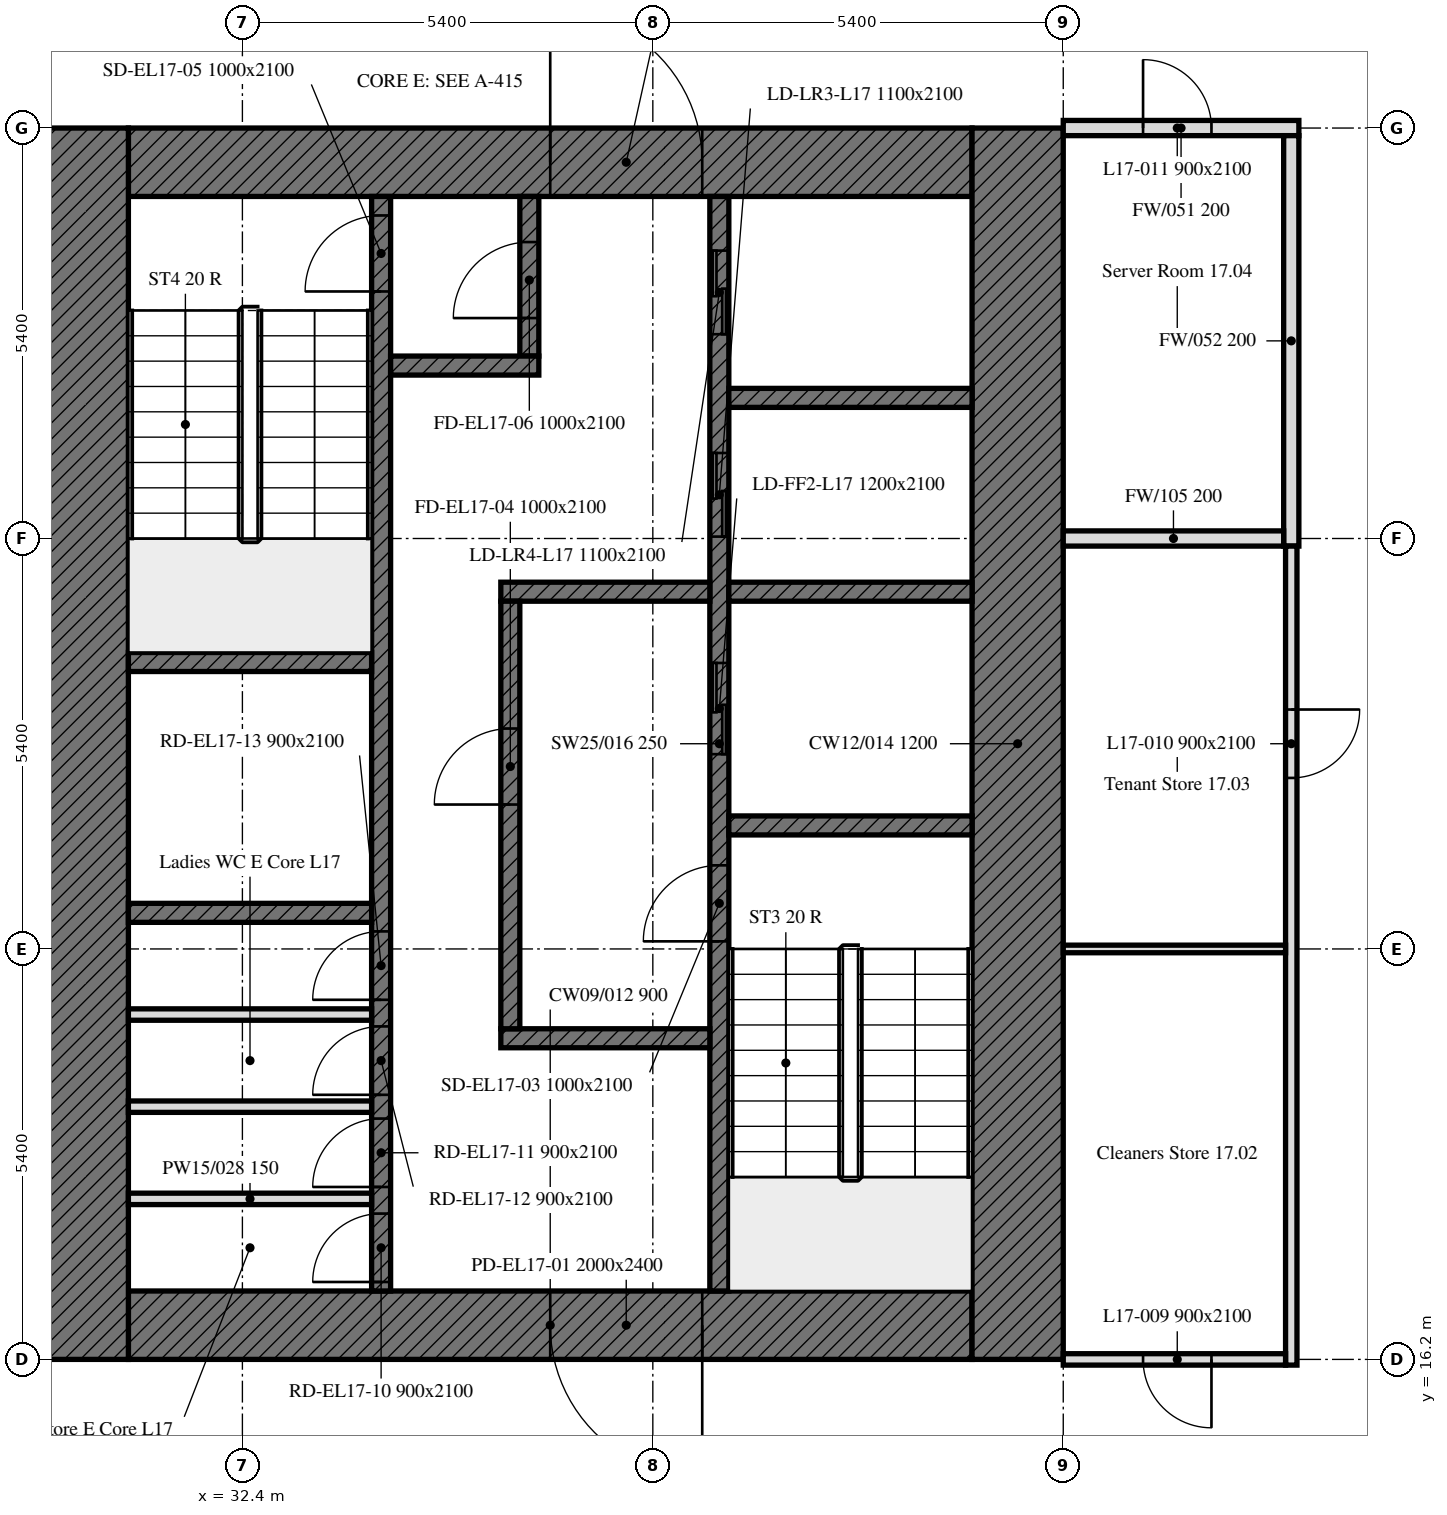
"""IFC4 building model, lengths in metres.
Left out: names, types, materials, properties, quantities, classifications, styles, units other than length and angle.
Written with IfcOpenShell. Run it as: python <this file> out.ifc"""

import sys

from ifc_helpers import new_model, si_unit, direction, frame, frame_2d, origin, place, context, subcontext, project, spatial, rectangle, extrude, element, fill, save


model = new_model("IFC4")
c1 = context("Model", 3, precision=1e-05, world=origin(), true_north=direction((0.0, 1.0)))
c2 = subcontext(c1, "Body", "Model", "MODEL_VIEW")
j1 = project(units=[si_unit("LENGTHUNIT", "METRE"), si_unit("PLANEANGLEUNIT", "RADIAN")], contexts=[c1])
p1 = place(None, origin())
s1 = spatial("IfcSite", under=j1, at=p1, CompositionType="ELEMENT")
p2 = place(p1, origin())
s2 = spatial("IfcBuilding", under=s1, at=p2, CompositionType="ELEMENT")
p3 = place(p2, frame((0.0, 0.0, 76.4)))
s3 = spatial("IfcBuildingStorey", under=s2, at=p3, CompositionType="ELEMENT", Elevation=76.4)
p4 = place(p3, frame((42.0, 16.65, 0.0), z_axis=(0.0, 0.0, 1.0), x_axis=(-1.0, 0.0, 0.0)))
e1 = element("IfcWall", 1, at=p4, inside=s3, PredefinedType="SOLIDWALL", context=c2, shape_type="SweptSolid", body=[
    extrude(rectangle(XDim=11.1, YDim=0.9, at=frame_2d((5.55, 0.0))), origin(), (0.0, 0.0, 1.0), 3.5),
])
p5 = place(p4, frame((3.55, 0.0, 0.0)))
e2 = element("IfcOpeningElement", 2, at=p5, cuts=e1, PredefinedType="OPENING", context=c2, shape_type="SweptSolid", body=[
    extrude(rectangle(XDim=2.0, YDim=2.4, at=frame_2d((1.0, 1.2))), frame((0.0, 0.45, 0.0), z_axis=(0.0, -1.0, 0.0), x_axis=(1.0, 0.0, 0.0)), (0.0, 0.0, 1.0), 0.9),
])
p6 = place(p3, frame((30.9, 31.95, 0.0), z_axis=(0.0, 0.0, 1.0), x_axis=(1.0, 0.0, 0.0)))
e3 = element("IfcWall", 3, at=p6, inside=s3, PredefinedType="SOLIDWALL", context=c2, shape_type="SweptSolid", body=[
    extrude(rectangle(XDim=11.1, YDim=0.9, at=frame_2d((5.55, 0.0))), origin(), (0.0, 0.0, 1.0), 3.5),
])
p7 = place(p6, frame((5.55, 0.0, 0.0)))
e4 = element("IfcOpeningElement", 4, at=p7, cuts=e3, PredefinedType="OPENING", context=c2, shape_type="SweptSolid", body=[
    extrude(rectangle(XDim=2.0, YDim=2.4, at=frame_2d((1.0, 1.2))), frame((0.0, 0.45, 0.0), z_axis=(0.0, -1.0, 0.0), x_axis=(1.0, 0.0, 0.0)), (0.0, 0.0, 1.0), 0.9),
])
for number, where, z_axis, x_axis in (
    (5, (42.6, 32.4, 0.0), (0.0, 0.0, 1.0), (0.0, -1.0, 0.0)),
    (6, (30.3, 16.2, 0.0), (0.0, 0.0, 1.0), (0.0, 1.0, 0.0)),
):
    element("IfcWall", number, at=place(p3, frame(where, z_axis=z_axis, x_axis=x_axis)), inside=s3, PredefinedType="SOLIDWALL", context=c2, shape_type="SweptSolid", body=[
        extrude(rectangle(XDim=16.2, YDim=1.2, at=frame_2d((8.1, 0.0))), origin(), (0.0, 0.0, 1.0), 3.5),
    ])
p8 = place(p3, frame((38.675, 17.1, 0.0), z_axis=(0.0, 0.0, 1.0), x_axis=(0.0, 1.0, 0.0)))
e7 = element("IfcWall", 7, at=p8, inside=s3, PredefinedType="SOLIDWALL", context=c2, shape_type="SweptSolid", body=[
    extrude(rectangle(XDim=14.4, YDim=0.25, at=frame_2d((7.2, 0.0))), origin(), (0.0, 0.0, 1.0), 3.5),
])
p9 = place(p8, frame((4.6, 0.0, 0.0)))
e8 = element("IfcOpeningElement", 8, at=p9, cuts=e7, PredefinedType="OPENING", context=c2, shape_type="SweptSolid", body=[
    extrude(rectangle(XDim=1.0, YDim=2.1, at=frame_2d((0.5, 1.05))), frame((0.0, 0.125, 0.0), z_axis=(0.0, -1.0, 0.0), x_axis=(1.0, 0.0, 0.0)), (0.0, 0.0, 1.0), 0.25),
])
p10 = place(p8, frame((7.062, 0.0, 0.0)))
e9 = element("IfcOpeningElement", 9, at=p10, cuts=e7, PredefinedType="OPENING", context=c2, shape_type="SweptSolid", body=[
    extrude(rectangle(XDim=1.2, YDim=2.1, at=frame_2d((0.6, 1.05))), frame((0.0, 0.125, 0.0), z_axis=(0.0, -1.0, 0.0), x_axis=(1.0, 0.0, 0.0)), (0.0, 0.0, 1.0), 0.25),
])
p11 = place(p8, frame((9.925, 0.0, 0.0)))
e10 = element("IfcOpeningElement", 10, at=p11, cuts=e7, PredefinedType="OPENING", context=c2, shape_type="SweptSolid", body=[
    extrude(rectangle(XDim=1.1, YDim=2.1, at=frame_2d((0.55, 1.05))), frame((0.0, 0.125, 0.0), z_axis=(0.0, -1.0, 0.0), x_axis=(1.0, 0.0, 0.0)), (0.0, 0.0, 1.0), 0.25),
])
p12 = place(p8, frame((12.587, 0.0, 0.0)))
e11 = element("IfcOpeningElement", 11, at=p12, cuts=e7, PredefinedType="OPENING", context=c2, shape_type="SweptSolid", body=[
    extrude(rectangle(XDim=1.1, YDim=2.1, at=frame_2d((0.55, 1.05))), frame((0.0, 0.125, 0.0), z_axis=(0.0, -1.0, 0.0), x_axis=(1.0, 0.0, 0.0)), (0.0, 0.0, 1.0), 0.25),
])
p13 = place(p3, frame((34.225, 17.1, 0.0), z_axis=(0.0, 0.0, 1.0), x_axis=(0.0, 1.0, 0.0)))
e12 = element("IfcWall", 12, at=p13, inside=s3, PredefinedType="SOLIDWALL", context=c2, shape_type="SweptSolid", body=[
    extrude(rectangle(XDim=14.4, YDim=0.25, at=frame_2d((7.2, 0.0))), origin(), (0.0, 0.0, 1.0), 3.5),
])
p14 = place(p13, frame((13.15, 0.0, 0.0)))
e13 = element("IfcOpeningElement", 13, at=p14, cuts=e12, PredefinedType="OPENING", context=c2, shape_type="SweptSolid", body=[
    extrude(rectangle(XDim=1.0, YDim=2.1, at=frame_2d((0.5, 1.05))), frame((0.0, 0.125, 0.0), z_axis=(0.0, -1.0, 0.0), x_axis=(1.0, 0.0, 0.0)), (0.0, 0.0, 1.0), 0.25),
])
p15 = place(p13, frame((0.118, 0.0, 0.0)))
e14 = element("IfcOpeningElement", 14, at=p15, cuts=e12, PredefinedType="OPENING", context=c2, shape_type="SweptSolid", body=[
    extrude(rectangle(XDim=0.9, YDim=2.1, at=frame_2d((0.45, 1.05))), frame((0.0, 0.125, 0.0), z_axis=(0.0, -1.0, 0.0), x_axis=(1.0, 0.0, 0.0)), (0.0, 0.0, 1.0), 0.25),
])
p16 = place(p13, frame((1.368, 0.0, 0.0)))
e15 = element("IfcOpeningElement", 15, at=p16, cuts=e12, PredefinedType="OPENING", context=c2, shape_type="SweptSolid", body=[
    extrude(rectangle(XDim=0.9, YDim=2.1, at=frame_2d((0.45, 1.05))), frame((0.0, 0.125, 0.0), z_axis=(0.0, -1.0, 0.0), x_axis=(1.0, 0.0, 0.0)), (0.0, 0.0, 1.0), 0.25),
])
p17 = place(p13, frame((2.581, 0.0, 0.0)))
e16 = element("IfcOpeningElement", 16, at=p17, cuts=e12, PredefinedType="OPENING", context=c2, shape_type="SweptSolid", body=[
    extrude(rectangle(XDim=0.9, YDim=2.1, at=frame_2d((0.45, 1.05))), frame((0.0, 0.125, 0.0), z_axis=(0.0, -1.0, 0.0), x_axis=(1.0, 0.0, 0.0)), (0.0, 0.0, 1.0), 0.25),
])
p18 = place(p13, frame((3.831, 0.0, 0.0)))
e17 = element("IfcOpeningElement", 17, at=p18, cuts=e12, PredefinedType="OPENING", context=c2, shape_type="SweptSolid", body=[
    extrude(rectangle(XDim=0.9, YDim=2.1, at=frame_2d((0.45, 1.05))), frame((0.0, 0.125, 0.0), z_axis=(0.0, -1.0, 0.0), x_axis=(1.0, 0.0, 0.0)), (0.0, 0.0, 1.0), 0.25),
])
p19 = place(p3, frame((38.8, 23.225, 0.0), z_axis=(0.0, 0.0, 1.0), x_axis=(1.0, 0.0, 0.0)))
e18 = element("IfcWall", 18, at=p19, inside=s3, PredefinedType="SOLIDWALL", context=c2, shape_type="SweptSolid", body=[
    extrude(rectangle(XDim=3.2, YDim=0.25, at=frame_2d((1.6, 0.0))), origin(), (0.0, 0.0, 1.0), 3.5),
])
for number, where, z_axis, x_axis in (
    (19, (30.9, 25.375, 0.0), (0.0, 0.0, 1.0), (1.0, 0.0, 0.0)),
    (20, (30.9, 22.075, 0.0), (0.0, 0.0, 1.0), (1.0, 0.0, 0.0)),
):
    element("IfcWall", number, at=place(p3, frame(where, z_axis=z_axis, x_axis=x_axis)), inside=s3, PredefinedType="SOLIDWALL", context=c2, shape_type="SweptSolid", body=[
        extrude(rectangle(XDim=3.2, YDim=0.25, at=frame_2d((1.6, 0.0))), origin(), (0.0, 0.0, 1.0), 3.5),
    ])
p20 = place(p3, frame((38.8, 26.3, 0.0), z_axis=(0.0, 0.0, 1.0), x_axis=(1.0, 0.0, 0.0)))
e21 = element("IfcWall", 21, at=p20, inside=s3, PredefinedType="SOLIDWALL", context=c2, shape_type="SweptSolid", body=[
    extrude(rectangle(XDim=3.2, YDim=0.25, at=frame_2d((1.6, 0.0))), origin(), (0.0, 0.0, 1.0), 3.5),
])
for number, where, z_axis, x_axis in (
    (22, (35.8, 26.3, 0.0), (0.0, 0.0, 1.0), (1.0, 0.0, 0.0)),
    (23, (35.8, 20.425, 0.0), (0.0, 0.0, 1.0), (1.0, 0.0, 0.0)),
):
    element("IfcWall", number, at=place(p3, frame(where, z_axis=z_axis, x_axis=x_axis)), inside=s3, PredefinedType="SOLIDWALL", context=c2, shape_type="SweptSolid", body=[
        extrude(rectangle(XDim=2.75, YDim=0.25, at=frame_2d((1.375, 0.0))), origin(), (0.0, 0.0, 1.0), 3.5),
    ])
p21 = place(p3, frame((36.175, 29.4, 0.0), z_axis=(0.0, 0.0, 1.0), x_axis=(0.0, 1.0, 0.0)))
e24 = element("IfcWall", 24, at=p21, inside=s3, PredefinedType="SOLIDWALL", context=c2, shape_type="SweptSolid", body=[
    extrude(rectangle(XDim=2.1, YDim=0.25, at=frame_2d((1.05, 0.0))), origin(), (0.0, 0.0, 1.0), 3.5),
])
p22 = place(p21, frame((0.5, 0.0, 0.0)))
e25 = element("IfcOpeningElement", 25, at=p22, cuts=e24, PredefinedType="OPENING", context=c2, shape_type="SweptSolid", body=[
    extrude(rectangle(XDim=1.0, YDim=2.1, at=frame_2d((0.5, 1.05))), frame((0.0, 0.125, 0.0), z_axis=(0.0, -1.0, 0.0), x_axis=(1.0, 0.0, 0.0)), (0.0, 0.0, 1.0), 0.25),
])
p23 = place(p3, frame((34.35, 29.275, 0.0), z_axis=(0.0, 0.0, 1.0), x_axis=(1.0, 0.0, 0.0)))
e26 = element("IfcWall", 26, at=p23, inside=s3, PredefinedType="SOLIDWALL", context=c2, shape_type="SweptSolid", body=[
    extrude(rectangle(XDim=1.95, YDim=0.25, at=frame_2d((0.975, 0.0))), origin(), (0.0, 0.0, 1.0), 3.5),
])
p24 = place(p3, frame((35.925, 20.55, 0.0), z_axis=(0.0, 0.0, 1.0), x_axis=(0.0, 1.0, 0.0)))
e27 = element("IfcWall", 27, at=p24, inside=s3, PredefinedType="SOLIDWALL", context=c2, shape_type="SweptSolid", body=[
    extrude(rectangle(XDim=5.625, YDim=0.25, at=frame_2d((2.812, 0.0))), origin(), (0.0, 0.0, 1.0), 3.5),
])
p25 = place(p24, frame((2.95, 0.0, 0.0)))
e28 = element("IfcOpeningElement", 28, at=p25, cuts=e27, PredefinedType="OPENING", context=c2, shape_type="SweptSolid", body=[
    extrude(rectangle(XDim=1.0, YDim=2.1, at=frame_2d((0.5, 1.05))), frame((0.0, 0.125, 0.0), z_axis=(0.0, -1.0, 0.0), x_axis=(1.0, 0.0, 0.0)), (0.0, 0.0, 1.0), 0.25),
])
p26 = place(p3, frame((38.8, 28.85, 0.0), z_axis=(0.0, 0.0, 1.0), x_axis=(1.0, 0.0, 0.0)))
e29 = element("IfcWall", 29, at=p26, inside=s3, PredefinedType="SOLIDWALL", context=c2, shape_type="SweptSolid", body=[
    extrude(rectangle(XDim=3.2, YDim=0.25, at=frame_2d((1.6, 0.0))), origin(), (0.0, 0.0, 1.0), 3.5),
])
for number, where, z_axis, x_axis in (
    (30, (30.9, 18.312, 0.0), (0.0, 0.0, 1.0), (1.0, 0.0, 0.0)),
    (31, (30.9, 19.525, 0.0), (0.0, 0.0, 1.0), (1.0, 0.0, 0.0)),
    (32, (30.9, 20.737, 0.0), (0.0, 0.0, 1.0), (1.0, 0.0, 0.0)),
):
    element("IfcWall", number, at=place(p3, frame(where, z_axis=z_axis, x_axis=x_axis)), inside=s3, PredefinedType="PARTITIONING", context=c2, shape_type="SweptSolid", body=[
        extrude(rectangle(XDim=3.2, YDim=0.15, at=frame_2d((1.6, 0.0))), origin(), (0.0, 0.0, 1.0), 3.5),
    ])
p27 = place(p3, frame((43.2, 32.4, 0.0), z_axis=(0.0, 0.0, 1.0), x_axis=(1.0, 0.0, 0.0)))
e33 = element("IfcWall", 33, at=p27, inside=s3, PredefinedType="PARTITIONING", context=c2, shape_type="SweptSolid", body=[
    extrude(rectangle(XDim=3.1, YDim=0.2, at=frame_2d((1.55, 0.0))), origin(), (0.0, 0.0, 1.0), 2.75),
])
p28 = place(p27, frame((1.05, 0.0, 0.0)))
e34 = element("IfcOpeningElement", 34, at=p28, cuts=e33, PredefinedType="OPENING", context=c2, shape_type="SweptSolid", body=[
    extrude(rectangle(XDim=0.9, YDim=2.1, at=frame_2d((0.45, 1.05))), frame((0.0, 0.1, 0.0), z_axis=(0.0, -1.0, 0.0), x_axis=(1.0, 0.0, 0.0)), (0.0, 0.0, 1.0), 0.2),
])
p29 = place(p3, frame((46.2, 32.3, 0.0), z_axis=(0.0, 0.0, 1.0), x_axis=(0.0, -1.0, 0.0)))
e35 = element("IfcWall", 35, at=p29, inside=s3, PredefinedType="PARTITIONING", context=c2, shape_type="SweptSolid", body=[
    extrude(rectangle(XDim=5.4, YDim=0.2, at=frame_2d((2.7, 0.0))), origin(), (0.0, 0.0, 1.0), 3.5),
])
p30 = place(p3, frame((46.2, 26.9, 0.0), z_axis=(0.0, 0.0, 1.0), x_axis=(0.0, -1.0, 0.0)))
e36 = element("IfcWall", 36, at=p30, inside=s3, PredefinedType="PARTITIONING", context=c2, shape_type="SweptSolid", body=[
    extrude(rectangle(XDim=10.775, YDim=0.15, at=frame_2d((5.387, 0.0))), origin(), (0.0, 0.0, 1.0), 3.5),
])
p31 = place(p30, frame((2.15, 0.0, 0.0)))
e37 = element("IfcOpeningElement", 37, at=p31, cuts=e36, PredefinedType="OPENING", context=c2, shape_type="SweptSolid", body=[
    extrude(rectangle(XDim=0.9, YDim=2.1, at=frame_2d((0.45, 1.05))), frame((0.0, 0.075, 0.0), z_axis=(0.0, -1.0, 0.0), x_axis=(1.0, 0.0, 0.0)), (0.0, 0.0, 1.0), 0.15),
])
p32 = place(p3, frame((46.125, 16.2, 0.0), z_axis=(0.0, 0.0, 1.0), x_axis=(-1.0, 0.0, 0.0)))
e38 = element("IfcWall", 38, at=p32, inside=s3, PredefinedType="PARTITIONING", context=c2, shape_type="SweptSolid", body=[
    extrude(rectangle(XDim=2.925, YDim=0.15, at=frame_2d((1.462, 0.0))), origin(), (0.0, 0.0, 1.0), 2.75),
])
p33 = place(p32, frame((0.975, 0.0, 0.0)))
e39 = element("IfcOpeningElement", 39, at=p33, cuts=e38, PredefinedType="OPENING", context=c2, shape_type="SweptSolid", body=[
    extrude(rectangle(XDim=0.9, YDim=2.1, at=frame_2d((0.45, 1.05))), frame((0.0, 0.075, 0.0), z_axis=(0.0, -1.0, 0.0), x_axis=(1.0, 0.0, 0.0)), (0.0, 0.0, 1.0), 0.15),
])
p34 = place(p3, frame((46.125, 21.6, 0.0), z_axis=(0.0, 0.0, 1.0), x_axis=(-1.0, 0.0, 0.0)))
e40 = element("IfcWall", 40, at=p34, inside=s3, PredefinedType="PARTITIONING", context=c2, shape_type="SweptSolid", body=[
    extrude(rectangle(XDim=2.925, YDim=0.1, at=frame_2d((1.462, 0.0))), origin(), (0.0, 0.0, 1.0), 2.75),
])
p35 = place(p3, frame((46.1, 27.0, 0.0), z_axis=(0.0, 0.0, 1.0), x_axis=(-1.0, 0.0, 0.0)))
e41 = element("IfcWall", 41, at=p35, inside=s3, PredefinedType="PARTITIONING", context=c2, shape_type="SweptSolid", body=[
    extrude(rectangle(XDim=2.9, YDim=0.2, at=frame_2d((1.45, 0.0))), origin(), (0.0, 0.0, 1.0), 2.75),
])
p36 = place(p5, origin())
e42 = element("IfcDoor", 42, at=p36, inside=s3, OperationType="DOUBLE_DOOR_SINGLE_SWING", PredefinedType="DOOR", context=c2, shape_type="SweptSolid", body=[
    extrude(rectangle(XDim=2.0, YDim=2.4, at=frame_2d((1.0, 1.2))), frame((0.0, 0.025, 0.0), z_axis=(0.0, -1.0, 0.0), x_axis=(1.0, 0.0, 0.0)), (0.0, 0.0, 1.0), 0.05),
])
fill(e2, e42)
p37 = place(p7, origin())
e43 = element("IfcDoor", 43, at=p37, inside=s3, OperationType="DOUBLE_DOOR_SINGLE_SWING", PredefinedType="DOOR", context=c2, shape_type="SweptSolid", body=[
    extrude(rectangle(XDim=2.0, YDim=2.4, at=frame_2d((1.0, 1.2))), frame((0.0, 0.025, 0.0), z_axis=(0.0, -1.0, 0.0), x_axis=(1.0, 0.0, 0.0)), (0.0, 0.0, 1.0), 0.05),
])
fill(e4, e43)
p38 = place(p9, origin())
e44 = element("IfcDoor", 44, at=p38, inside=s3, OperationType="SINGLE_SWING_LEFT", PredefinedType="DOOR", context=c2, shape_type="SweptSolid", body=[
    extrude(rectangle(XDim=1.0, YDim=2.1, at=frame_2d((0.5, 1.05))), frame((0.0, 0.025, 0.0), z_axis=(0.0, -1.0, 0.0), x_axis=(1.0, 0.0, 0.0)), (0.0, 0.0, 1.0), 0.05),
])
fill(e8, e44)
p39 = place(p25, origin())
e45 = element("IfcDoor", 45, at=p39, inside=s3, OperationType="SINGLE_SWING_LEFT", PredefinedType="DOOR", context=c2, shape_type="SweptSolid", body=[
    extrude(rectangle(XDim=1.0, YDim=2.1, at=frame_2d((0.5, 1.05))), frame((0.0, 0.025, 0.0), z_axis=(0.0, -1.0, 0.0), x_axis=(1.0, 0.0, 0.0)), (0.0, 0.0, 1.0), 0.05),
])
fill(e28, e45)
p40 = place(p14, origin())
e46 = element("IfcDoor", 46, at=p40, inside=s3, OperationType="SINGLE_SWING_LEFT", PredefinedType="DOOR", context=c2, shape_type="SweptSolid", body=[
    extrude(rectangle(XDim=1.0, YDim=2.1, at=frame_2d((0.5, 1.05))), frame((0.0, 0.025, 0.0), z_axis=(0.0, -1.0, 0.0), x_axis=(1.0, 0.0, 0.0)), (0.0, 0.0, 1.0), 0.05),
])
fill(e13, e46)
p41 = place(p22, origin())
e47 = element("IfcDoor", 47, at=p41, inside=s3, OperationType="SINGLE_SWING_LEFT", PredefinedType="DOOR", context=c2, shape_type="SweptSolid", body=[
    extrude(rectangle(XDim=1.0, YDim=2.1, at=frame_2d((0.5, 1.05))), frame((0.0, 0.025, 0.0), z_axis=(0.0, -1.0, 0.0), x_axis=(1.0, 0.0, 0.0)), (0.0, 0.0, 1.0), 0.05),
])
fill(e25, e47)
p42 = place(p10, origin())
e48 = element("IfcDoor", 48, at=p42, inside=s3, OperationType="DOUBLE_DOOR_SLIDING", PredefinedType="DOOR", context=c2, shape_type="SweptSolid", body=[
    extrude(rectangle(XDim=1.2, YDim=2.1, at=frame_2d((0.6, 1.05))), frame((0.0, 0.025, 0.0), z_axis=(0.0, -1.0, 0.0), x_axis=(1.0, 0.0, 0.0)), (0.0, 0.0, 1.0), 0.05),
])
fill(e9, e48)
p43 = place(p11, origin())
e49 = element("IfcDoor", 49, at=p43, inside=s3, OperationType="DOUBLE_DOOR_SLIDING", PredefinedType="DOOR", context=c2, shape_type="SweptSolid", body=[
    extrude(rectangle(XDim=1.1, YDim=2.1, at=frame_2d((0.55, 1.05))), frame((0.0, 0.025, 0.0), z_axis=(0.0, -1.0, 0.0), x_axis=(1.0, 0.0, 0.0)), (0.0, 0.0, 1.0), 0.05),
])
fill(e10, e49)
p44 = place(p12, origin())
e50 = element("IfcDoor", 50, at=p44, inside=s3, OperationType="DOUBLE_DOOR_SLIDING", PredefinedType="DOOR", context=c2, shape_type="SweptSolid", body=[
    extrude(rectangle(XDim=1.1, YDim=2.1, at=frame_2d((0.55, 1.05))), frame((0.0, 0.025, 0.0), z_axis=(0.0, -1.0, 0.0), x_axis=(1.0, 0.0, 0.0)), (0.0, 0.0, 1.0), 0.05),
])
fill(e11, e50)
p45 = place(p15, origin())
e51 = element("IfcDoor", 51, at=p45, inside=s3, OperationType="SINGLE_SWING_LEFT", PredefinedType="DOOR", context=c2, shape_type="SweptSolid", body=[
    extrude(rectangle(XDim=0.9, YDim=2.1, at=frame_2d((0.45, 1.05))), frame((0.0, 0.025, 0.0), z_axis=(0.0, -1.0, 0.0), x_axis=(1.0, 0.0, 0.0)), (0.0, 0.0, 1.0), 0.05),
])
fill(e14, e51)
p46 = place(p16, origin())
e52 = element("IfcDoor", 52, at=p46, inside=s3, OperationType="SINGLE_SWING_LEFT", PredefinedType="DOOR", context=c2, shape_type="SweptSolid", body=[
    extrude(rectangle(XDim=0.9, YDim=2.1, at=frame_2d((0.45, 1.05))), frame((0.0, 0.025, 0.0), z_axis=(0.0, -1.0, 0.0), x_axis=(1.0, 0.0, 0.0)), (0.0, 0.0, 1.0), 0.05),
])
fill(e15, e52)
p47 = place(p17, origin())
e53 = element("IfcDoor", 53, at=p47, inside=s3, OperationType="SINGLE_SWING_LEFT", PredefinedType="DOOR", context=c2, shape_type="SweptSolid", body=[
    extrude(rectangle(XDim=0.9, YDim=2.1, at=frame_2d((0.45, 1.05))), frame((0.0, 0.025, 0.0), z_axis=(0.0, -1.0, 0.0), x_axis=(1.0, 0.0, 0.0)), (0.0, 0.0, 1.0), 0.05),
])
fill(e16, e53)
p48 = place(p18, origin())
e54 = element("IfcDoor", 54, at=p48, inside=s3, OperationType="SINGLE_SWING_LEFT", PredefinedType="DOOR", context=c2, shape_type="SweptSolid", body=[
    extrude(rectangle(XDim=0.9, YDim=2.1, at=frame_2d((0.45, 1.05))), frame((0.0, 0.025, 0.0), z_axis=(0.0, -1.0, 0.0), x_axis=(1.0, 0.0, 0.0)), (0.0, 0.0, 1.0), 0.05),
])
fill(e17, e54)
p49 = place(p33, origin())
e55 = element("IfcDoor", 55, at=p49, inside=s3, OperationType="SINGLE_SWING_LEFT", PredefinedType="DOOR", context=c2, shape_type="SweptSolid", body=[
    extrude(rectangle(XDim=0.9, YDim=2.1, at=frame_2d((0.45, 1.05))), frame((0.0, 0.025, 0.0), z_axis=(0.0, -1.0, 0.0), x_axis=(1.0, 0.0, 0.0)), (0.0, 0.0, 1.0), 0.05),
])
fill(e39, e55)
p50 = place(p31, origin())
e56 = element("IfcDoor", 56, at=p50, inside=s3, OperationType="SINGLE_SWING_LEFT", PredefinedType="DOOR", context=c2, shape_type="SweptSolid", body=[
    extrude(rectangle(XDim=0.9, YDim=2.1, at=frame_2d((0.45, 1.05))), frame((0.0, 0.025, 0.0), z_axis=(0.0, -1.0, 0.0), x_axis=(1.0, 0.0, 0.0)), (0.0, 0.0, 1.0), 0.05),
])
fill(e37, e56)
p51 = place(p28, origin())
e57 = element("IfcDoor", 57, at=p51, inside=s3, OperationType="SINGLE_SWING_LEFT", PredefinedType="DOOR", context=c2, shape_type="SweptSolid", body=[
    extrude(rectangle(XDim=0.9, YDim=2.1, at=frame_2d((0.45, 1.05))), frame((0.0, 0.025, 0.0), z_axis=(0.0, -1.0, 0.0), x_axis=(1.0, 0.0, 0.0)), (0.0, 0.0, 1.0), 0.05),
])
fill(e34, e57)
save(model, sys.argv[1])
